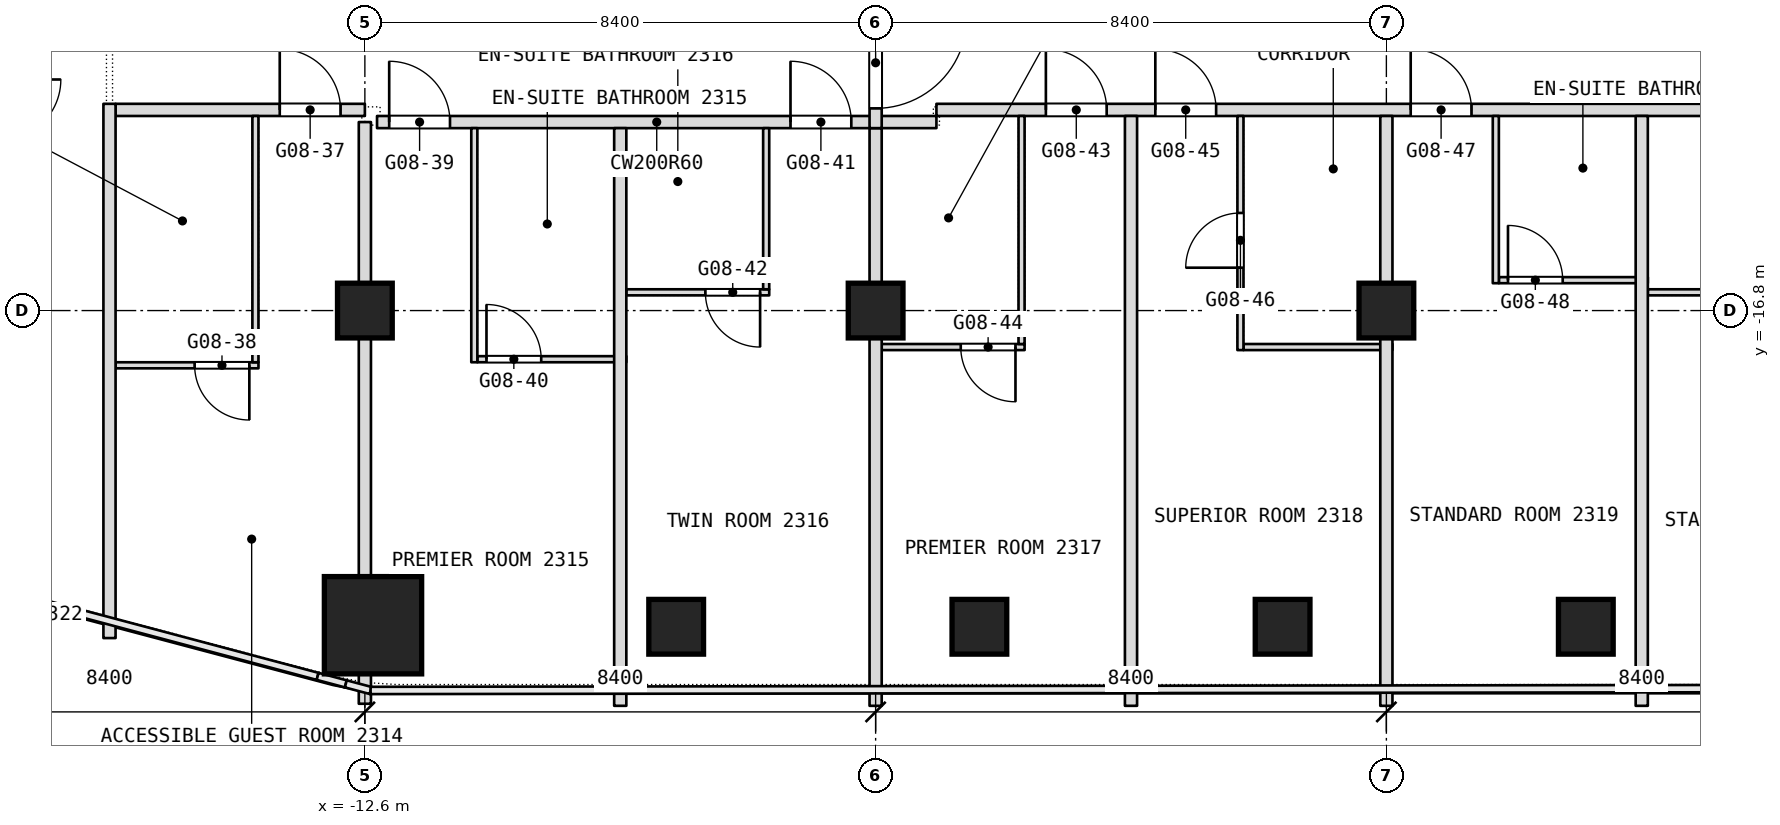
"""IFC4 building model, lengths in metres.
Left out: names, types, materials, properties, quantities, classifications, styles, units other than length and angle.
Written with IfcOpenShell. Run it as: python <this file> out.ifc"""

import sys

from ifc_helpers import new_model, si_unit, direction, frame, frame_2d, origin, origin_2d, place, context, subcontext, project, spatial, rectangle, extrude, element, fill, save


model = new_model("IFC4")
c1 = context("Model", 3, precision=1e-05, world=origin(), true_north=direction((0.0, 1.0)))
c2 = subcontext(c1, "Body", "Model", "MODEL_VIEW")
j1 = project(units=[si_unit("LENGTHUNIT", "METRE"), si_unit("PLANEANGLEUNIT", "RADIAN")], contexts=[c1])
p1 = place(None, origin())
s1 = spatial("IfcSite", under=j1, at=p1, CompositionType="ELEMENT")
p2 = place(p1, origin())
s2 = spatial("IfcBuilding", under=s1, at=p2, CompositionType="ELEMENT")
p3 = place(p2, frame((0.0, 0.0, 108.5)))
s3 = spatial("IfcBuildingStorey", under=s2, at=p3, CompositionType="ELEMENT", Elevation=108.5)
p4 = place(p3, frame((-12.466, -21.975, 0.0), z_axis=(0.0, 0.0, 1.0), x_axis=(1.0, 0.0, 0.0)))
e1 = element("IfcColumn", 1, at=p4, inside=s3, PredefinedType="COLUMN", context=c2, shape_type="SweptSolid", body=[
    extrude(rectangle(XDim=1.6, YDim=1.6, at=origin_2d()), origin(), (0.0, 0.0, 1.0), 3.6),
])
for number, where, z_axis, x_axis in (
    (2, (-12.6, -16.8, 0.0), (0.0, 0.0, 1.0), (1.0, 0.0, 0.0)),
    (3, (-4.2, -16.8, 0.0), (0.0, 0.0, 1.0), (1.0, 0.0, 0.0)),
    (4, (4.2, -16.8, 0.0), (0.0, 0.0, 1.0), (1.0, 0.0, 0.0)),
    (5, (7.48, -22.0, 0.0), (0.0, 0.0, 1.0), (1.0, 0.0, 0.0)),
    (6, (2.493, -22.0, 0.0), (0.0, 0.0, 1.0), (1.0, 0.0, 0.0)),
    (7, (-2.493, -22.0, 0.0), (0.0, 0.0, 1.0), (1.0, 0.0, 0.0)),
    (8, (-7.48, -22.0, 0.0), (0.0, 0.0, 1.0), (1.0, 0.0, 0.0)),
):
    element("IfcColumn", number, at=place(p3, frame(where, z_axis=z_axis, x_axis=x_axis)), inside=s3, PredefinedType="COLUMN", context=c2, shape_type="SweptSolid", body=[
        extrude(rectangle(XDim=0.9, YDim=0.9, at=origin_2d()), origin(), (0.0, 0.0, 1.0), 3.6),
    ])
p5 = place(p3, frame((-16.7, -17.7, 0.0), z_axis=(0.0, 0.0, 1.0), x_axis=(1.0, 0.0, 0.0)))
e9 = element("IfcWall", 9, at=p5, inside=s3, PredefinedType="PARTITIONING", context=c2, shape_type="SweptSolid", body=[
    extrude(rectangle(XDim=2.35, YDim=0.1, at=frame_2d((1.175, 0.0))), origin(), (0.0, 0.0, 1.0), 3.34),
])
p6 = place(p5, frame((1.3, 0.0, 0.0)))
e10 = element("IfcOpeningElement", 10, at=p6, cuts=e9, PredefinedType="OPENING", context=c2, shape_type="SweptSolid", body=[
    extrude(rectangle(XDim=0.9, YDim=2.1, at=frame_2d((0.45, 1.05))), frame((0.0, 0.05, 0.0), z_axis=(0.0, -1.0, 0.0), x_axis=(1.0, 0.0, 0.0)), (0.0, 0.0, 1.0), 0.1),
])
p7 = place(p3, frame((-10.75, -17.6, 0.0), z_axis=(0.0, 0.0, 1.0), x_axis=(1.0, 0.0, 0.0)))
e11 = element("IfcWall", 11, at=p7, inside=s3, PredefinedType="PARTITIONING", context=c2, shape_type="SweptSolid", body=[
    extrude(rectangle(XDim=2.45, YDim=0.1, at=frame_2d((1.225, 0.0))), origin(), (0.0, 0.0, 1.0), 3.34),
])
p8 = place(p7, frame((0.15, 0.0, 0.0)))
e12 = element("IfcOpeningElement", 12, at=p8, cuts=e11, PredefinedType="OPENING", context=c2, shape_type="SweptSolid", body=[
    extrude(rectangle(XDim=0.9, YDim=2.1, at=frame_2d((0.45, 1.05))), frame((0.0, 0.05, 0.0), z_axis=(0.0, -1.0, 0.0), x_axis=(1.0, 0.0, 0.0)), (0.0, 0.0, 1.0), 0.1),
])
p9 = place(p3, frame((-4.1, -17.4, 0.0), z_axis=(0.0, 0.0, 1.0), x_axis=(1.0, 0.0, 0.0)))
e13 = element("IfcWall", 13, at=p9, inside=s3, PredefinedType="PARTITIONING", context=c2, shape_type="SweptSolid", body=[
    extrude(rectangle(XDim=2.35, YDim=0.1, at=frame_2d((1.175, 0.0))), origin(), (0.0, 0.0, 1.0), 3.34),
])
p10 = place(p9, frame((1.3, 0.0, 0.0)))
e14 = element("IfcOpeningElement", 14, at=p10, cuts=e13, PredefinedType="OPENING", context=c2, shape_type="SweptSolid", body=[
    extrude(rectangle(XDim=0.9, YDim=2.1, at=frame_2d((0.45, 1.05))), frame((0.0, 0.05, 0.0), z_axis=(0.0, -1.0, 0.0), x_axis=(1.0, 0.0, 0.0)), (0.0, 0.0, 1.0), 0.1),
])
p11 = place(p3, frame((1.85, -17.4, 0.0), z_axis=(0.0, 0.0, 1.0), x_axis=(1.0, 0.0, 0.0)))
e15 = element("IfcWall", 15, at=p11, inside=s3, PredefinedType="PARTITIONING", context=c2, shape_type="SweptSolid", body=[
    extrude(rectangle(XDim=2.45, YDim=0.1, at=frame_2d((1.225, 0.0))), origin(), (0.0, 0.0, 1.0), 3.34),
])
p12 = place(p3, frame((-8.3, -16.5, 0.0), z_axis=(0.0, 0.0, 1.0), x_axis=(1.0, 0.0, 0.0)))
e16 = element("IfcWall", 16, at=p12, inside=s3, PredefinedType="PARTITIONING", context=c2, shape_type="SweptSolid", body=[
    extrude(rectangle(XDim=2.35, YDim=0.1, at=frame_2d((1.175, 0.0))), origin(), (0.0, 0.0, 1.0), 3.34),
])
p13 = place(p12, frame((1.3, 0.0, 0.0)))
e17 = element("IfcOpeningElement", 17, at=p13, cuts=e16, PredefinedType="OPENING", context=c2, shape_type="SweptSolid", body=[
    extrude(rectangle(XDim=0.9, YDim=2.1, at=frame_2d((0.45, 1.05))), frame((0.0, 0.05, 0.0), z_axis=(0.0, -1.0, 0.0), x_axis=(1.0, 0.0, 0.0)), (0.0, 0.0, 1.0), 0.1),
])
p14 = place(p3, frame((8.5, -16.5, 0.0), z_axis=(0.0, 0.0, 1.0), x_axis=(1.0, 0.0, 0.0)))
e18 = element("IfcWall", 18, at=p14, inside=s3, PredefinedType="PARTITIONING", context=c2, shape_type="SweptSolid", body=[
    extrude(rectangle(XDim=2.35, YDim=0.1, at=frame_2d((1.175, 0.0))), origin(), (0.0, 0.0, 1.0), 3.34),
])
p15 = place(p14, frame((1.3, 0.0, 0.0)))
e19 = element("IfcOpeningElement", 19, at=p15, cuts=e18, PredefinedType="OPENING", context=c2, shape_type="SweptSolid", body=[
    extrude(rectangle(XDim=0.9, YDim=2.1, at=frame_2d((0.45, 1.05))), frame((0.0, 0.05, 0.0), z_axis=(0.0, -1.0, 0.0), x_axis=(1.0, 0.0, 0.0)), (0.0, 0.0, 1.0), 0.1),
])
p16 = place(p3, frame((6.05, -16.3, 0.0), z_axis=(0.0, 0.0, 1.0), x_axis=(1.0, 0.0, 0.0)))
e20 = element("IfcWall", 20, at=p16, inside=s3, PredefinedType="PARTITIONING", context=c2, shape_type="SweptSolid", body=[
    extrude(rectangle(XDim=2.45, YDim=0.1, at=frame_2d((1.225, 0.0))), origin(), (0.0, 0.0, 1.0), 3.34),
])
p17 = place(p16, frame((0.15, 0.0, 0.0)))
e21 = element("IfcOpeningElement", 21, at=p17, cuts=e20, PredefinedType="OPENING", context=c2, shape_type="SweptSolid", body=[
    extrude(rectangle(XDim=0.9, YDim=2.1, at=frame_2d((0.45, 1.05))), frame((0.0, 0.05, 0.0), z_axis=(0.0, -1.0, 0.0), x_axis=(1.0, 0.0, 0.0)), (0.0, 0.0, 1.0), 0.1),
])
p18 = place(p3, frame((-12.4, -13.7, 0.0), z_axis=(0.0, 0.0, 1.0), x_axis=(1.0, 0.0, 0.0)))
e22 = element("IfcWall", 22, at=p18, inside=s3, PredefinedType="PARTITIONING", context=c2, shape_type="SweptSolid", body=[
    extrude(rectangle(XDim=9.2, YDim=0.2, at=frame_2d((4.6, 0.0))), origin(), (0.0, 0.0, 1.0), 3.34),
])
p19 = place(p18, frame((0.2, 0.0, 0.0)))
e23 = element("IfcOpeningElement", 23, at=p19, cuts=e22, PredefinedType="OPENING", context=c2, shape_type="SweptSolid", body=[
    extrude(rectangle(XDim=1.0, YDim=2.1, at=frame_2d((0.5, 1.05))), frame((0.0, 0.1, 0.0), z_axis=(0.0, -1.0, 0.0), x_axis=(1.0, 0.0, 0.0)), (0.0, 0.0, 1.0), 0.2),
])
p20 = place(p18, frame((6.8, 0.0, 0.0)))
e24 = element("IfcOpeningElement", 24, at=p20, cuts=e22, PredefinedType="OPENING", context=c2, shape_type="SweptSolid", body=[
    extrude(rectangle(XDim=1.0, YDim=2.1, at=frame_2d((0.5, 1.05))), frame((0.0, 0.1, 0.0), z_axis=(0.0, -1.0, 0.0), x_axis=(1.0, 0.0, 0.0)), (0.0, 0.0, 1.0), 0.2),
])
p21 = place(p3, frame((-16.7, -13.5, 0.0), z_axis=(0.0, 0.0, 1.0), x_axis=(1.0, 0.0, 0.0)))
e25 = element("IfcWall", 25, at=p21, inside=s3, PredefinedType="PARTITIONING", context=c2, shape_type="SweptSolid", body=[
    extrude(rectangle(XDim=4.1, YDim=0.2, at=frame_2d((2.05, 0.0))), origin(), (0.0, 0.0, 1.0), 3.34),
])
p22 = place(p21, frame((2.7, 0.0, 0.0)))
e26 = element("IfcOpeningElement", 26, at=p22, cuts=e25, PredefinedType="OPENING", context=c2, shape_type="SweptSolid", body=[
    extrude(rectangle(XDim=1.0, YDim=2.1, at=frame_2d((0.5, 1.05))), frame((0.0, 0.1, 0.0), z_axis=(0.0, -1.0, 0.0), x_axis=(1.0, 0.0, 0.0)), (0.0, 0.0, 1.0), 0.2),
])
p23 = place(p3, frame((-3.2, -13.5, 0.0), z_axis=(0.0, 0.0, 1.0), x_axis=(1.0, 0.0, 0.0)))
e27 = element("IfcWall", 27, at=p23, inside=s3, PredefinedType="PARTITIONING", context=c2, shape_type="SweptSolid", body=[
    extrude(rectangle(XDim=19.9, YDim=0.2, at=frame_2d((9.95, 0.0))), origin(), (0.0, 0.0, 1.0), 3.34),
])
p24 = place(p23, frame((1.8, 0.0, 0.0)))
e28 = element("IfcOpeningElement", 28, at=p24, cuts=e27, PredefinedType="OPENING", context=c2, shape_type="SweptSolid", body=[
    extrude(rectangle(XDim=1.0, YDim=2.1, at=frame_2d((0.5, 1.05))), frame((0.0, 0.1, 0.0), z_axis=(0.0, -1.0, 0.0), x_axis=(1.0, 0.0, 0.0)), (0.0, 0.0, 1.0), 0.2),
])
p25 = place(p23, frame((3.6, 0.0, 0.0)))
e29 = element("IfcOpeningElement", 29, at=p25, cuts=e27, PredefinedType="OPENING", context=c2, shape_type="SweptSolid", body=[
    extrude(rectangle(XDim=1.0, YDim=2.1, at=frame_2d((0.5, 1.05))), frame((0.0, 0.1, 0.0), z_axis=(0.0, -1.0, 0.0), x_axis=(1.0, 0.0, 0.0)), (0.0, 0.0, 1.0), 0.2),
])
p26 = place(p23, frame((7.8, 0.0, 0.0)))
e30 = element("IfcOpeningElement", 30, at=p26, cuts=e27, PredefinedType="OPENING", context=c2, shape_type="SweptSolid", body=[
    extrude(rectangle(XDim=1.0, YDim=2.1, at=frame_2d((0.5, 1.05))), frame((0.0, 0.1, 0.0), z_axis=(0.0, -1.0, 0.0), x_axis=(1.0, 0.0, 0.0)), (0.0, 0.0, 1.0), 0.2),
])
p27 = place(p23, frame((14.4, 0.0, 0.0)))
e31 = element("IfcOpeningElement", 31, at=p27, cuts=e27, PredefinedType="OPENING", context=c2, shape_type="SweptSolid", body=[
    extrude(rectangle(XDim=1.0, YDim=2.1, at=frame_2d((0.5, 1.05))), frame((0.0, 0.1, 0.0), z_axis=(0.0, -1.0, 0.0), x_axis=(1.0, 0.0, 0.0)), (0.0, 0.0, 1.0), 0.2),
])
p28 = place(p23, frame((18.6, 0.0, 0.0)))
e32 = element("IfcOpeningElement", 32, at=p28, cuts=e27, PredefinedType="OPENING", context=c2, shape_type="SweptSolid", body=[
    extrude(rectangle(XDim=1.0, YDim=2.1, at=frame_2d((0.5, 1.05))), frame((0.0, 0.1, 0.0), z_axis=(0.0, -1.0, 0.0), x_axis=(1.0, 0.0, 0.0)), (0.0, 0.0, 1.0), 0.2),
])
p29 = place(p3, frame((8.4, -23.3, 0.0), z_axis=(0.0, 0.0, 1.0), x_axis=(0.0, 1.0, 0.0)))
e33 = element("IfcWall", 33, at=p29, inside=s3, PredefinedType="PARTITIONING", context=c2, shape_type="SweptSolid", body=[
    extrude(rectangle(XDim=9.7, YDim=0.2, at=frame_2d((4.85, 0.0))), origin(), (0.0, 0.0, 1.0), 3.34),
])
p30 = place(p3, frame((6.0, -16.35, 0.0), z_axis=(0.0, 0.0, 1.0), x_axis=(0.0, 1.0, 0.0)))
e34 = element("IfcWall", 34, at=p30, inside=s3, PredefinedType="PARTITIONING", context=c2, shape_type="SweptSolid", body=[
    extrude(rectangle(XDim=2.75, YDim=0.1, at=frame_2d((1.375, 0.0))), origin(), (0.0, 0.0, 1.0), 3.34),
])
p31 = place(p3, frame((4.2, -23.3, 0.0), z_axis=(0.0, 0.0, 1.0), x_axis=(0.0, 1.0, 0.0)))
e35 = element("IfcWall", 35, at=p31, inside=s3, PredefinedType="PARTITIONING", context=c2, shape_type="SweptSolid", body=[
    extrude(rectangle(XDim=9.7, YDim=0.2, at=frame_2d((4.85, 0.0))), origin(), (0.0, 0.0, 1.0), 3.34),
])
p32 = place(p3, frame((1.8, -17.45, 0.0), z_axis=(0.0, 0.0, 1.0), x_axis=(0.0, 1.0, 0.0)))
e36 = element("IfcWall", 36, at=p32, inside=s3, PredefinedType="PARTITIONING", context=c2, shape_type="SweptSolid", body=[
    extrude(rectangle(XDim=3.85, YDim=0.1, at=frame_2d((1.925, 0.0))), origin(), (0.0, 0.0, 1.0), 3.34),
])
p33 = place(p32, frame((1.355, 0.0, 0.0)))
e37 = element("IfcOpeningElement", 37, at=p33, cuts=e36, PredefinedType="OPENING", context=c2, shape_type="SweptSolid", body=[
    extrude(rectangle(XDim=0.9, YDim=2.1, at=frame_2d((0.45, 1.05))), frame((0.0, 0.05, 0.0), z_axis=(0.0, -1.0, 0.0), x_axis=(1.0, 0.0, 0.0)), (0.0, 0.0, 1.0), 0.1),
])
p34 = place(p3, frame((0.0, -23.3, 0.0), z_axis=(0.0, 0.0, 1.0), x_axis=(0.0, 1.0, 0.0)))
e38 = element("IfcWall", 38, at=p34, inside=s3, PredefinedType="PARTITIONING", context=c2, shape_type="SweptSolid", body=[
    extrude(rectangle(XDim=9.7, YDim=0.2, at=frame_2d((4.85, 0.0))), origin(), (0.0, 0.0, 1.0), 3.34),
])
p35 = place(p3, frame((-1.8, -17.35, 0.0), z_axis=(0.0, 0.0, 1.0), x_axis=(0.0, 1.0, 0.0)))
e39 = element("IfcWall", 39, at=p35, inside=s3, PredefinedType="PARTITIONING", context=c2, shape_type="SweptSolid", body=[
    extrude(rectangle(XDim=3.75, YDim=0.1, at=frame_2d((1.875, 0.0))), origin(), (0.0, 0.0, 1.0), 3.34),
])
p36 = place(p3, frame((-4.2, -23.3, 0.0), z_axis=(0.0, 0.0, 1.0), x_axis=(0.0, 1.0, 0.0)))
e40 = element("IfcWall", 40, at=p36, inside=s3, PredefinedType="PARTITIONING", context=c2, shape_type="SweptSolid", body=[
    extrude(rectangle(XDim=9.5, YDim=0.2, at=frame_2d((4.75, 0.0))), origin(), (0.0, 0.0, 1.0), 3.34),
])
p37 = place(p3, frame((-4.2, -13.8, 0.0), z_axis=(0.0, 0.0, 1.0), x_axis=(0.0, 1.0, 0.0)))
e41 = element("IfcWall", 41, at=p37, inside=s3, PredefinedType="PARTITIONING", context=c2, shape_type="SweptSolid", body=[
    extrude(rectangle(XDim=13.8, YDim=0.2, at=frame_2d((6.9, 0.0))), origin(), (0.0, 0.0, 1.0), 3.34),
])
p38 = place(p37, frame((12.15, 0.0, 0.0)))
e42 = element("IfcOpeningElement", 42, at=p38, cuts=e41, PredefinedType="OPENING", context=c2, shape_type="SweptSolid", body=[
    extrude(rectangle(XDim=1.5, YDim=2.1, at=frame_2d((0.75, 1.05))), frame((0.0, 0.1, 0.0), z_axis=(0.0, -1.0, 0.0), x_axis=(1.0, 0.0, 0.0)), (0.0, 0.0, 1.0), 0.2),
])
p39 = place(p37, frame((0.325, 0.0, 0.0)))
e43 = element("IfcOpeningElement", 43, at=p39, cuts=e41, PredefinedType="OPENING", context=c2, shape_type="SweptSolid", body=[
    extrude(rectangle(XDim=1.5, YDim=2.1, at=frame_2d((0.75, 1.05))), frame((0.0, 0.1, 0.0), z_axis=(0.0, -1.0, 0.0), x_axis=(1.0, 0.0, 0.0)), (0.0, 0.0, 1.0), 0.2),
])
p40 = place(p3, frame((-6.0, -16.45, 0.0), z_axis=(0.0, 0.0, 1.0), x_axis=(0.0, 1.0, 0.0)))
e44 = element("IfcWall", 44, at=p40, inside=s3, PredefinedType="PARTITIONING", context=c2, shape_type="SweptSolid", body=[
    extrude(rectangle(XDim=2.65, YDim=0.1, at=frame_2d((1.325, 0.0))), origin(), (0.0, 0.0, 1.0), 3.34),
])
p41 = place(p3, frame((-8.4, -23.3, 0.0), z_axis=(0.0, 0.0, 1.0), x_axis=(0.0, 1.0, 0.0)))
e45 = element("IfcWall", 45, at=p41, inside=s3, PredefinedType="PARTITIONING", context=c2, shape_type="SweptSolid", body=[
    extrude(rectangle(XDim=9.5, YDim=0.2, at=frame_2d((4.75, 0.0))), origin(), (0.0, 0.0, 1.0), 3.34),
])
p42 = place(p3, frame((-10.8, -17.65, 0.0), z_axis=(0.0, 0.0, 1.0), x_axis=(0.0, 1.0, 0.0)))
e46 = element("IfcWall", 46, at=p42, inside=s3, PredefinedType="PARTITIONING", context=c2, shape_type="SweptSolid", body=[
    extrude(rectangle(XDim=3.85, YDim=0.1, at=frame_2d((1.925, 0.0))), origin(), (0.0, 0.0, 1.0), 3.34),
])
p43 = place(p3, frame((-12.6, -23.266, 0.0), z_axis=(0.0, 0.0, 1.0), x_axis=(0.0, 1.0, 0.0)))
e47 = element("IfcWall", 47, at=p43, inside=s3, PredefinedType="PARTITIONING", context=c2, shape_type="SweptSolid", body=[
    extrude(rectangle(XDim=0.491, YDim=0.2, at=frame_2d((0.246, 0.0))), origin(), (0.0, 0.0, 1.0), 3.34),
])
p44 = place(p3, frame((-12.6, -21.175, 0.0), z_axis=(0.0, 0.0, 1.0), x_axis=(0.0, 1.0, 0.0)))
e48 = element("IfcWall", 48, at=p44, inside=s3, PredefinedType="PARTITIONING", context=c2, shape_type="SweptSolid", body=[
    extrude(rectangle(XDim=7.475, YDim=0.2, at=frame_2d((3.738, 0.0))), origin(), (0.0, 0.0, 1.0), 3.34),
])
p45 = place(p3, frame((-14.4, -17.65, 0.0), z_axis=(0.0, 0.0, 1.0), x_axis=(0.0, 1.0, 0.0)))
e49 = element("IfcWall", 49, at=p45, inside=s3, PredefinedType="PARTITIONING", context=c2, shape_type="SweptSolid", body=[
    extrude(rectangle(XDim=4.05, YDim=0.1, at=frame_2d((2.025, 0.0))), origin(), (0.0, 0.0, 1.0), 3.34),
])
p46 = place(p3, frame((-16.8, -22.186, 0.0), z_axis=(0.0, 0.0, 1.0), x_axis=(0.0, 1.0, 0.0)))
e50 = element("IfcWall", 50, at=p46, inside=s3, PredefinedType="PARTITIONING", context=c2, shape_type="SweptSolid", body=[
    extrude(rectangle(XDim=8.786, YDim=0.2, at=frame_2d((4.393, 0.0))), origin(), (0.0, 0.0, 1.0), 3.34),
])
p47 = place(p6, origin())
e51 = element("IfcDoor", 51, at=p47, inside=s3, OperationType="SINGLE_SWING_RIGHT", PredefinedType="DOOR", context=c2, shape_type="SweptSolid", body=[
    extrude(rectangle(XDim=0.9, YDim=2.1, at=frame_2d((0.45, 1.05))), frame((0.0, 0.025, 0.0), z_axis=(0.0, -1.0, 0.0), x_axis=(1.0, 0.0, 0.0)), (0.0, 0.0, 1.0), 0.05),
])
fill(e10, e51)
p48 = place(p8, origin())
e52 = element("IfcDoor", 52, at=p48, inside=s3, OperationType="SINGLE_SWING_LEFT", PredefinedType="DOOR", context=c2, shape_type="SweptSolid", body=[
    extrude(rectangle(XDim=0.9, YDim=2.1, at=frame_2d((0.45, 1.05))), frame((0.0, 0.025, 0.0), z_axis=(0.0, -1.0, 0.0), x_axis=(1.0, 0.0, 0.0)), (0.0, 0.0, 1.0), 0.05),
])
fill(e12, e52)
p49 = place(p10, origin())
e53 = element("IfcDoor", 53, at=p49, inside=s3, OperationType="SINGLE_SWING_RIGHT", PredefinedType="DOOR", context=c2, shape_type="SweptSolid", body=[
    extrude(rectangle(XDim=0.9, YDim=2.1, at=frame_2d((0.45, 1.05))), frame((0.0, 0.025, 0.0), z_axis=(0.0, -1.0, 0.0), x_axis=(1.0, 0.0, 0.0)), (0.0, 0.0, 1.0), 0.05),
])
fill(e14, e53)
p50 = place(p13, origin())
e54 = element("IfcDoor", 54, at=p50, inside=s3, OperationType="SINGLE_SWING_RIGHT", PredefinedType="DOOR", context=c2, shape_type="SweptSolid", body=[
    extrude(rectangle(XDim=0.9, YDim=2.1, at=frame_2d((0.45, 1.05))), frame((0.0, 0.025, 0.0), z_axis=(0.0, -1.0, 0.0), x_axis=(1.0, 0.0, 0.0)), (0.0, 0.0, 1.0), 0.05),
])
fill(e17, e54)
p51 = place(p17, origin())
e55 = element("IfcDoor", 55, at=p51, inside=s3, OperationType="SINGLE_SWING_LEFT", PredefinedType="DOOR", context=c2, shape_type="SweptSolid", body=[
    extrude(rectangle(XDim=0.9, YDim=2.1, at=frame_2d((0.45, 1.05))), frame((0.0, 0.025, 0.0), z_axis=(0.0, -1.0, 0.0), x_axis=(1.0, 0.0, 0.0)), (0.0, 0.0, 1.0), 0.05),
])
fill(e21, e55)
p52 = place(p19, origin())
e56 = element("IfcDoor", 56, at=p52, inside=s3, OperationType="SINGLE_SWING_RIGHT", PredefinedType="DOOR", context=c2, shape_type="SweptSolid", body=[
    extrude(rectangle(XDim=1.0, YDim=2.1, at=frame_2d((0.5, 1.05))), frame((0.0, 0.025, 0.0), z_axis=(0.0, -1.0, 0.0), x_axis=(1.0, 0.0, 0.0)), (0.0, 0.0, 1.0), 0.05),
])
fill(e23, e56)
p53 = place(p20, origin())
e57 = element("IfcDoor", 57, at=p53, inside=s3, OperationType="SINGLE_SWING_LEFT", PredefinedType="DOOR", context=c2, shape_type="SweptSolid", body=[
    extrude(rectangle(XDim=1.0, YDim=2.1, at=frame_2d((0.5, 1.05))), frame((0.0, 0.025, 0.0), z_axis=(0.0, -1.0, 0.0), x_axis=(1.0, 0.0, 0.0)), (0.0, 0.0, 1.0), 0.05),
])
fill(e24, e57)
p54 = place(p22, origin())
e58 = element("IfcDoor", 58, at=p54, inside=s3, OperationType="SINGLE_SWING_LEFT", PredefinedType="DOOR", context=c2, shape_type="SweptSolid", body=[
    extrude(rectangle(XDim=1.0, YDim=2.1, at=frame_2d((0.5, 1.05))), frame((0.0, 0.025, 0.0), z_axis=(0.0, -1.0, 0.0), x_axis=(1.0, 0.0, 0.0)), (0.0, 0.0, 1.0), 0.05),
])
fill(e26, e58)
p55 = place(p24, origin())
e59 = element("IfcDoor", 59, at=p55, inside=s3, OperationType="SINGLE_SWING_LEFT", PredefinedType="DOOR", context=c2, shape_type="SweptSolid", body=[
    extrude(rectangle(XDim=1.0, YDim=2.1, at=frame_2d((0.5, 1.05))), frame((0.0, 0.025, 0.0), z_axis=(0.0, -1.0, 0.0), x_axis=(1.0, 0.0, 0.0)), (0.0, 0.0, 1.0), 0.05),
])
fill(e28, e59)
p56 = place(p25, origin())
e60 = element("IfcDoor", 60, at=p56, inside=s3, OperationType="SINGLE_SWING_LEFT", PredefinedType="DOOR", context=c2, shape_type="SweptSolid", body=[
    extrude(rectangle(XDim=1.0, YDim=2.1, at=frame_2d((0.5, 1.05))), frame((0.0, 0.025, 0.0), z_axis=(0.0, -1.0, 0.0), x_axis=(1.0, 0.0, 0.0)), (0.0, 0.0, 1.0), 0.05),
])
fill(e29, e60)
p57 = place(p26, origin())
e61 = element("IfcDoor", 61, at=p57, inside=s3, OperationType="SINGLE_SWING_LEFT", PredefinedType="DOOR", context=c2, shape_type="SweptSolid", body=[
    extrude(rectangle(XDim=1.0, YDim=2.1, at=frame_2d((0.5, 1.05))), frame((0.0, 0.025, 0.0), z_axis=(0.0, -1.0, 0.0), x_axis=(1.0, 0.0, 0.0)), (0.0, 0.0, 1.0), 0.05),
])
fill(e30, e61)
p58 = place(p33, origin())
e62 = element("IfcDoor", 62, at=p58, inside=s3, OperationType="SINGLE_SWING_RIGHT", PredefinedType="DOOR", context=c2, shape_type="SweptSolid", body=[
    extrude(rectangle(XDim=0.9, YDim=2.1, at=frame_2d((0.45, 1.05))), frame((0.0, 0.025, 0.0), z_axis=(0.0, -1.0, 0.0), x_axis=(1.0, 0.0, 0.0)), (0.0, 0.0, 1.0), 0.05),
])
fill(e37, e62)
p59 = place(p39, origin())
e63 = element("IfcDoor", 63, at=p59, inside=s3, OperationType="DOUBLE_DOOR_DOUBLE_SWING", PredefinedType="DOOR", context=c2, shape_type="SweptSolid", body=[
    extrude(rectangle(XDim=1.5, YDim=2.1, at=frame_2d((0.75, 1.05))), frame((0.0, 0.025, 0.0), z_axis=(0.0, -1.0, 0.0), x_axis=(1.0, 0.0, 0.0)), (0.0, 0.0, 1.0), 0.05),
])
fill(e43, e63)
save(model, sys.argv[1])
